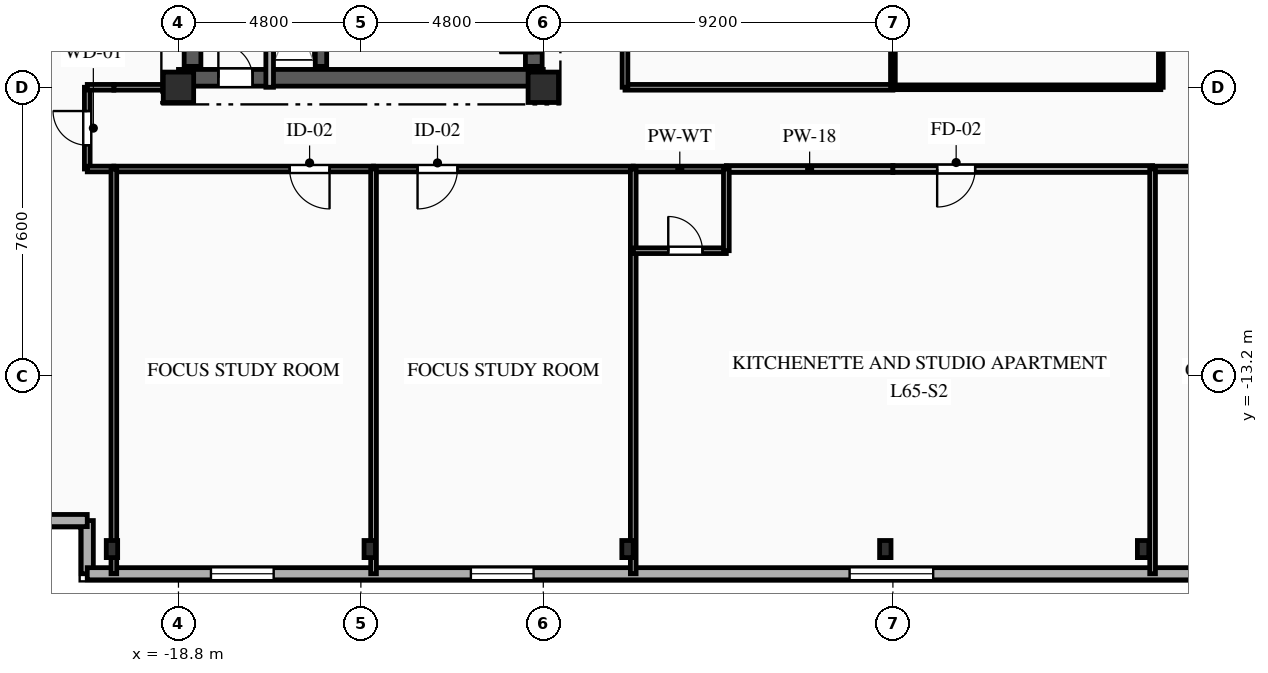
"""IFC4 building model, lengths in metres.
Left out: names, types, materials, properties, quantities, classifications, styles, units other than length and angle.
Written with IfcOpenShell. Run it as: python <this file> out.ifc"""

import sys

from ifc_helpers import new_model, si_unit, direction, frame, frame_2d, origin, origin_2d, place, context, subcontext, project, spatial, rectangle, i_section, extrude, element, fill, save


model = new_model("IFC4")
c1 = context("Model", 3, precision=1e-05, world=origin(), true_north=direction((0.0, 1.0)))
c2 = subcontext(c1, "Body", "Model", "MODEL_VIEW")
j1 = project(units=[si_unit("LENGTHUNIT", "METRE"), si_unit("PLANEANGLEUNIT", "RADIAN")], contexts=[c1])
p1 = place(None, origin())
s1 = spatial("IfcSite", under=j1, at=p1, CompositionType="ELEMENT")
p2 = place(p1, origin())
s2 = spatial("IfcBuilding", under=s1, at=p2, CompositionType="ELEMENT")
p3 = place(p2, frame((0.0, 0.0, 231.65)))
s3 = spatial("IfcBuildingStorey", under=s2, at=p3, CompositionType="ELEMENT", Elevation=231.65)
for number, where, z_axis, x_axis in (
    (1, (-18.8, -5.6, 0.0), (0.0, 0.0, 1.0), (1.0, 0.0, 0.0)),
    (2, (-9.2, -5.6, 0.0), (0.0, 0.0, 1.0), (1.0, 0.0, 0.0)),
):
    element("IfcColumn", number, at=place(p3, frame(where, z_axis=z_axis, x_axis=x_axis)), inside=s3, PredefinedType="COLUMN", context=c2, shape_type="SweptSolid", body=[
        extrude(rectangle(XDim=0.8, YDim=0.8, at=origin_2d()), origin(), (0.0, 0.0, 1.0), 3.35),
    ])
for number, where, z_axis, x_axis in (
    (3, (-20.55, -17.75, 0.0), (0.0, 0.0, 1.0), (1.0, 0.0, 0.0)),
    (4, (-13.767, -17.75, 0.0), (0.0, 0.0, 1.0), (1.0, 0.0, 0.0)),
    (5, (-6.983, -17.75, 0.0), (0.0, 0.0, 1.0), (1.0, 0.0, 0.0)),
    (6, (-0.2, -17.75, 0.0), (0.0, 0.0, 1.0), (1.0, 0.0, 0.0)),
    (7, (6.583, -17.75, 0.0), (0.0, 0.0, 1.0), (1.0, 0.0, 0.0)),
):
    element("IfcColumn", number, at=place(p3, frame(where, z_axis=z_axis, x_axis=x_axis)), inside=s3, PredefinedType="COLUMN", context=c2, shape_type="SweptSolid", body=[
        extrude(i_section(OverallWidth=0.3, OverallDepth=0.45, WebThickness=0.014, FlangeThickness=0.026, FilletRadius=0.027, at=origin_2d()), origin(), (0.0, 0.0, 1.0), 3.35),
    ])
p4 = place(p3, frame((-21.2, -18.4, 0.0), z_axis=(0.0, 0.0, 1.0), x_axis=(0.0, 1.0, 0.0)))
e8 = element("IfcWall", 8, at=p4, inside=s3, PredefinedType="SOLIDWALL", context=c2, shape_type="SweptSolid", body=[
    extrude(rectangle(XDim=1.4, YDim=0.32, at=frame_2d((0.7, 0.0))), origin(), (0.0, 0.0, 1.0), 3.04),
])
p5 = place(p3, frame((-21.2, -17.0, 0.0), z_axis=(0.0, 0.0, 1.0), x_axis=(-1.0, 0.0, 0.0)))
e9 = element("IfcWall", 9, at=p5, inside=s3, PredefinedType="SOLIDWALL", context=c2, shape_type="SweptSolid", body=[
    extrude(rectangle(XDim=1.4, YDim=0.32, at=frame_2d((0.7, 0.0))), origin(), (0.0, 0.0, 1.0), 3.04),
])
p6 = place(p3, frame((20.8, -18.4, 0.0), z_axis=(0.0, 0.0, 1.0), x_axis=(-1.0, 0.0, 0.0)))
e10 = element("IfcWall", 10, at=p6, inside=s3, PredefinedType="SOLIDWALL", context=c2, shape_type="SweptSolid", body=[
    extrude(rectangle(XDim=42.0, YDim=0.32, at=frame_2d((21.0, 0.0))), origin(), (0.0, 0.0, 1.0), 3.04),
])
p7 = place(p6, frame((3.015, 0.0, 0.85)))
e11 = element("IfcOpeningElement", 11, at=p7, cuts=e10, PredefinedType="OPENING", context=c2, shape_type="SweptSolid", body=[
    extrude(rectangle(XDim=1.65, YDim=1.85, at=frame_2d((0.825, 0.925))), frame((0.0, 0.17, 0.0), z_axis=(0.0, -1.0, 0.0), x_axis=(1.0, 0.0, 0.0)), (0.0, 0.0, 1.0), 0.34),
])
p8 = place(p6, frame((9.775, 0.0, 0.85)))
e12 = element("IfcOpeningElement", 12, at=p8, cuts=e10, PredefinedType="OPENING", context=c2, shape_type="SweptSolid", body=[
    extrude(rectangle(XDim=1.65, YDim=1.85, at=frame_2d((0.825, 0.925))), frame((0.0, 0.17, 0.0), z_axis=(0.0, -1.0, 0.0), x_axis=(1.0, 0.0, 0.0)), (0.0, 0.0, 1.0), 0.34),
])
p9 = place(p6, frame((19.74, 0.0, 0.85)))
e13 = element("IfcOpeningElement", 13, at=p9, cuts=e10, PredefinedType="OPENING", context=c2, shape_type="SweptSolid", body=[
    extrude(rectangle(XDim=2.2, YDim=1.85, at=frame_2d((1.1, 0.925))), frame((0.0, 0.17, 0.0), z_axis=(0.0, -1.0, 0.0), x_axis=(1.0, 0.0, 0.0)), (0.0, 0.0, 1.0), 0.34),
])
p10 = place(p6, frame((30.255, 0.0, 0.85)))
e14 = element("IfcOpeningElement", 14, at=p10, cuts=e10, PredefinedType="OPENING", context=c2, shape_type="SweptSolid", body=[
    extrude(rectangle(XDim=1.65, YDim=1.85, at=frame_2d((0.825, 0.925))), frame((0.0, 0.17, 0.0), z_axis=(0.0, -1.0, 0.0), x_axis=(1.0, 0.0, 0.0)), (0.0, 0.0, 1.0), 0.34),
])
p11 = place(p6, frame((37.095, 0.0, 0.85)))
e15 = element("IfcOpeningElement", 15, at=p11, cuts=e10, PredefinedType="OPENING", context=c2, shape_type="SweptSolid", body=[
    extrude(rectangle(XDim=1.65, YDim=1.85, at=frame_2d((0.825, 0.925))), frame((0.0, 0.17, 0.0), z_axis=(0.0, -1.0, 0.0), x_axis=(1.0, 0.0, 0.0)), (0.0, 0.0, 1.0), 0.34),
])
p12 = place(p3, frame((-18.8, -5.35, 0.0), z_axis=(0.0, 0.0, 1.0), x_axis=(1.0, 0.0, 0.0)))
e16 = element("IfcWall", 16, at=p12, inside=s3, PredefinedType="SHEAR", context=c2, shape_type="SweptSolid", body=[
    extrude(rectangle(XDim=9.6, YDim=0.44, at=frame_2d((4.8, 0.0))), origin(), (0.0, 0.0, 1.0), 3.04),
])
p13 = place(p12, frame((1.05, 0.0, 0.0)))
e17 = element("IfcOpeningElement", 17, at=p13, cuts=e16, PredefinedType="OPENING", context=c2, shape_type="SweptSolid", body=[
    extrude(rectangle(XDim=0.9, YDim=2.1, at=frame_2d((0.45, 1.05))), frame((0.0, 0.23, 0.0), z_axis=(0.0, -1.0, 0.0), x_axis=(1.0, 0.0, 0.0)), (0.0, 0.0, 1.0), 0.46),
])
p14 = place(p3, frame((-18.43, -5.05, 0.0), z_axis=(0.0, 0.0, 1.0), x_axis=(0.0, 1.0, 0.0)))
e18 = element("IfcWall", 18, at=p14, inside=s3, PredefinedType="SHEAR", context=c2, shape_type="SweptSolid", body=[
    extrude(rectangle(XDim=10.1, YDim=0.44, at=frame_2d((5.05, 0.0))), origin(), (0.0, 0.0, 1.0), 3.04),
])
p15 = place(p3, frame((-9.45, -5.05, 0.0), z_axis=(0.0, 0.0, 1.0), x_axis=(0.0, 1.0, 0.0)))
e19 = element("IfcWall", 19, at=p15, inside=s3, PredefinedType="SHEAR", context=c2, shape_type="SweptSolid", body=[
    extrude(rectangle(XDim=10.1, YDim=0.44, at=frame_2d((5.05, 0.0))), origin(), (0.0, 0.0, 1.0), 3.04),
])
p16 = place(p15, frame((7.175, 0.0, 0.0)))
e20 = element("IfcOpeningElement", 20, at=p16, cuts=e19, PredefinedType="OPENING", context=c2, shape_type="SweptSolid", body=[
    extrude(rectangle(XDim=0.9, YDim=2.1, at=frame_2d((0.45, 1.05))), frame((0.0, 0.23, 0.0), z_axis=(0.0, -1.0, 0.0), x_axis=(1.0, 0.0, 0.0)), (0.0, 0.0, 1.0), 0.46),
])
p17 = place(p15, frame((2.4, 0.0, 0.0)))
e21 = element("IfcOpeningElement", 21, at=p17, cuts=e19, PredefinedType="OPENING", context=c2, shape_type="SweptSolid", body=[
    extrude(rectangle(XDim=1.2, YDim=2.15, at=frame_2d((0.6, 1.075))), frame((0.0, 0.23, 0.0), z_axis=(0.0, -1.0, 0.0), x_axis=(1.0, 0.0, 0.0)), (0.0, 0.0, 1.0), 0.46),
])
p18 = place(p15, frame((0.35, 0.0, 0.0)))
e22 = element("IfcOpeningElement", 22, at=p18, cuts=e19, PredefinedType="OPENING", context=c2, shape_type="SweptSolid", body=[
    extrude(rectangle(XDim=0.9, YDim=2.1, at=frame_2d((0.45, 1.05))), frame((0.0, 0.23, 0.0), z_axis=(0.0, -1.0, 0.0), x_axis=(1.0, 0.0, 0.0)), (0.0, 0.0, 1.0), 0.46),
])
p19 = place(p15, frame((5.0, 0.0, 0.0)))
e23 = element("IfcOpeningElement", 23, at=p19, cuts=e19, PredefinedType="OPENING", context=c2, shape_type="SweptSolid", body=[
    extrude(rectangle(XDim=0.9, YDim=2.1, at=frame_2d((0.45, 1.05))), frame((0.0, 0.23, 0.0), z_axis=(0.0, -1.0, 0.0), x_axis=(1.0, 0.0, 0.0)), (0.0, 0.0, 1.0), 0.46),
])
p20 = place(p3, frame((-15.05, -5.05, 0.0), z_axis=(0.0, 0.0, 1.0), x_axis=(0.0, 1.0, 0.0)))
e24 = element("IfcWall", 24, at=p20, inside=s3, PredefinedType="SHEAR", context=c2, shape_type="SweptSolid", body=[
    extrude(rectangle(XDim=10.1, YDim=0.3, at=frame_2d((5.05, 0.0))), origin(), (0.0, 0.0, 1.0), 3.04),
])
p21 = place(p3, frame((-16.4, -5.6, 0.0), z_axis=(0.0, 0.0, 1.0), x_axis=(0.0, 1.0, 0.0)))
e25 = element("IfcWall", 25, at=p21, inside=s3, PredefinedType="PARTITIONING", context=c2, shape_type="SweptSolid", body=[
    extrude(rectangle(XDim=3.49, YDim=0.2, at=frame_2d((1.745, 0.0))), origin(), (0.0, 0.0, 1.0), 3.04),
])
p22 = place(p3, frame((-21.2, -7.75, 0.0), z_axis=(0.0, 0.0, 1.0), x_axis=(0.0, 1.0, 0.0)))
e26 = element("IfcWall", 26, at=p22, inside=s3, PredefinedType="PARTITIONING", context=c2, shape_type="SweptSolid", body=[
    extrude(rectangle(XDim=2.15, YDim=0.15, at=frame_2d((1.075, 0.0))), origin(), (0.0, 0.0, 1.0), 2.695),
])
p23 = place(p22, frame((0.625, 0.0, 0.0)))
e27 = element("IfcOpeningElement", 27, at=p23, cuts=e26, PredefinedType="OPENING", context=c2, shape_type="SweptSolid", body=[
    extrude(rectangle(XDim=0.9, YDim=2.1, at=frame_2d((0.45, 1.05))), frame((0.0, 0.085, 0.0), z_axis=(0.0, -1.0, 0.0), x_axis=(1.0, 0.0, 0.0)), (0.0, 0.0, 1.0), 0.17),
])
p24 = place(p3, frame((-20.5, -5.6, 0.0), z_axis=(0.0, 0.0, 1.0), x_axis=(1.0, 0.0, 0.0)))
e28 = element("IfcWall", 28, at=p24, inside=s3, PredefinedType="PARTITIONING", context=c2, shape_type="SweptSolid", body=[
    extrude(rectangle(XDim=1.7, YDim=0.15, at=frame_2d((0.85, 0.0))), origin(), (0.0, 0.0, 1.0), 3.04),
])
for number, where, z_axis, x_axis in (
    (29, (-20.5, -7.75, 0.0), (0.0, 0.0, 1.0), (-1.0, 0.0, 0.0)),
    (30, (-21.2, -5.6, 0.0), (0.0, 0.0, 1.0), (1.0, 0.0, 0.0)),
):
    element("IfcWall", number, at=place(p3, frame(where, z_axis=z_axis, x_axis=x_axis)), inside=s3, PredefinedType="PARTITIONING", context=c2, shape_type="SweptSolid", body=[
        extrude(rectangle(XDim=0.7, YDim=0.15, at=frame_2d((0.35, 0.0))), origin(), (0.0, 0.0, 1.0), 3.04),
    ])
p25 = place(p3, frame((-13.667, -7.75, 0.0), z_axis=(0.0, 0.0, 1.0), x_axis=(-1.0, 0.0, 0.0)))
e31 = element("IfcWall", 31, at=p25, inside=s3, PredefinedType="PARTITIONING", context=c2, shape_type="SweptSolid", body=[
    extrude(rectangle(XDim=6.833, YDim=0.15, at=frame_2d((3.417, 0.0))), origin(), (0.0, 0.0, 1.0), 3.04),
])
p26 = place(p25, frame((1.158, 0.0, 0.0)))
e32 = element("IfcOpeningElement", 32, at=p26, cuts=e31, PredefinedType="OPENING", context=c2, shape_type="SweptSolid", body=[
    extrude(rectangle(XDim=1.05, YDim=2.15, at=frame_2d((0.525, 1.075))), frame((0.0, 0.085, 0.0), z_axis=(0.0, -1.0, 0.0), x_axis=(1.0, 0.0, 0.0)), (0.0, 0.0, 1.0), 0.17),
])
p27 = place(p3, frame((-6.833, -7.75, 0.0), z_axis=(0.0, 0.0, 1.0), x_axis=(-1.0, 0.0, 0.0)))
e33 = element("IfcWall", 33, at=p27, inside=s3, PredefinedType="PARTITIONING", context=c2, shape_type="SweptSolid", body=[
    extrude(rectangle(XDim=6.833, YDim=0.15, at=frame_2d((3.417, 0.0))), origin(), (0.0, 0.0, 1.0), 3.04),
])
p28 = place(p27, frame((4.625, 0.0, 0.0)))
e34 = element("IfcOpeningElement", 34, at=p28, cuts=e33, PredefinedType="OPENING", context=c2, shape_type="SweptSolid", body=[
    extrude(rectangle(XDim=1.05, YDim=2.15, at=frame_2d((0.525, 1.075))), frame((0.0, 0.085, 0.0), z_axis=(0.0, -1.0, 0.0), x_axis=(1.0, 0.0, 0.0)), (0.0, 0.0, 1.0), 0.17),
])
p29 = place(p3, frame((0.0, -7.75, 0.0), z_axis=(0.0, 0.0, 1.0), x_axis=(-1.0, 0.0, 0.0)))
e35 = element("IfcWall", 35, at=p29, inside=s3, PredefinedType="PARTITIONING", context=c2, shape_type="SweptSolid", body=[
    extrude(rectangle(XDim=4.383, YDim=0.18, at=frame_2d((2.191, 0.0))), origin(), (0.0, 0.0, 1.0), 3.04),
])
p30 = place(p3, frame((-4.383, -7.75, 0.0), z_axis=(0.0, 0.0, 1.0), x_axis=(-1.0, 0.0, 0.0)))
e36 = element("IfcWall", 36, at=p30, inside=s3, PredefinedType="PLUMBINGWALL", context=c2, shape_type="SweptSolid", body=[
    extrude(rectangle(XDim=2.45, YDim=0.15, at=frame_2d((1.225, 0.0))), origin(), (0.0, 0.0, 1.0), 3.04),
])
p31 = place(p3, frame((-7.05, -5.6, 0.0), z_axis=(0.0, 0.0, 1.0), x_axis=(1.0, 0.0, 0.0)))
e37 = element("IfcWall", 37, at=p31, inside=s3, PredefinedType="PARTITIONING", context=c2, shape_type="SweptSolid", body=[
    extrude(rectangle(XDim=7.05, YDim=0.15, at=frame_2d((3.525, 0.0))), origin(), (0.0, 0.0, 1.0), 2.525),
])
p32 = place(p3, frame((6.833, -7.75, 0.0), z_axis=(0.0, 0.0, 1.0), x_axis=(-1.0, 0.0, 0.0)))
e38 = element("IfcWall", 38, at=p32, inside=s3, PredefinedType="PARTITIONING", context=c2, shape_type="SweptSolid", body=[
    extrude(rectangle(XDim=6.833, YDim=0.18, at=frame_2d((3.417, 0.0))), origin(), (0.0, 0.0, 1.0), 3.04),
])
p33 = place(p32, frame((4.669, 0.0, 0.0)))
e39 = element("IfcOpeningElement", 39, at=p33, cuts=e38, PredefinedType="OPENING", context=c2, shape_type="SweptSolid", body=[
    extrude(rectangle(XDim=1.0, YDim=2.15, at=frame_2d((0.5, 1.075))), frame((0.0, 0.1, 0.0), z_axis=(0.0, -1.0, 0.0), x_axis=(1.0, 0.0, 0.0)), (0.0, 0.0, 1.0), 0.2),
])
p34 = place(p3, frame((13.667, -7.75, 0.0), z_axis=(0.0, 0.0, 1.0), x_axis=(-1.0, 0.0, 0.0)))
e40 = element("IfcWall", 40, at=p34, inside=s3, PredefinedType="PARTITIONING", context=c2, shape_type="SweptSolid", body=[
    extrude(rectangle(XDim=6.833, YDim=0.15, at=frame_2d((3.417, 0.0))), origin(), (0.0, 0.0, 1.0), 3.04),
])
p35 = place(p34, frame((1.158, 0.0, 0.0)))
e41 = element("IfcOpeningElement", 41, at=p35, cuts=e40, PredefinedType="OPENING", context=c2, shape_type="SweptSolid", body=[
    extrude(rectangle(XDim=1.05, YDim=2.15, at=frame_2d((0.525, 1.075))), frame((0.0, 0.085, 0.0), z_axis=(0.0, -1.0, 0.0), x_axis=(1.0, 0.0, 0.0)), (0.0, 0.0, 1.0), 0.17),
])
p36 = place(p3, frame((0.0, -5.6, 0.0), z_axis=(0.0, 0.0, 1.0), x_axis=(1.0, 0.0, 0.0)))
e42 = element("IfcWall", 42, at=p36, inside=s3, PredefinedType="PARTITIONING", context=c2, shape_type="SweptSolid", body=[
    extrude(rectangle(XDim=7.05, YDim=0.125, at=frame_2d((3.525, 0.0))), origin(), (0.0, 0.0, 1.0), 2.525),
])
p37 = place(p3, frame((-7.05, 8.5, 0.0), z_axis=(0.0, 0.0, 1.0), x_axis=(0.0, -1.0, 0.0)))
e43 = element("IfcWall", 43, at=p37, inside=s3, PredefinedType="PARTITIONING", context=c2, shape_type="SweptSolid", body=[
    extrude(rectangle(XDim=14.1, YDim=0.15, at=frame_2d((7.05, 0.0))), origin(), (0.0, 0.0, 1.0), 3.04),
])
p38 = place(p37, frame((8.074, 0.0, 0.0)))
e44 = element("IfcOpeningElement", 44, at=p38, cuts=e43, PredefinedType="OPENING", context=c2, shape_type="SweptSolid", body=[
    extrude(rectangle(XDim=0.95, YDim=2.1, at=frame_2d((0.475, 1.05))), frame((0.0, 0.085, 0.0), z_axis=(0.0, -1.0, 0.0), x_axis=(1.0, 0.0, 0.0)), (0.0, 0.0, 1.0), 0.17),
])
p39 = place(p3, frame((7.05, -5.6, 0.0), z_axis=(0.0, 0.0, 1.0), x_axis=(0.0, 1.0, 0.0)))
e45 = element("IfcWall", 45, at=p39, inside=s3, PredefinedType="PARTITIONING", context=c2, shape_type="SweptSolid", body=[
    extrude(rectangle(XDim=14.1, YDim=0.125, at=frame_2d((7.05, 0.0))), origin(), (0.0, 0.0, 1.0), 3.04),
])
p40 = place(p39, frame((5.076, 0.0, 0.0)))
e46 = element("IfcOpeningElement", 46, at=p40, cuts=e45, PredefinedType="OPENING", context=c2, shape_type="SweptSolid", body=[
    extrude(rectangle(XDim=0.95, YDim=2.1, at=frame_2d((0.475, 1.05))), frame((0.0, 0.073, 0.0), z_axis=(0.0, -1.0, 0.0), x_axis=(1.0, 0.0, 0.0)), (0.0, 0.0, 1.0), 0.145),
])
p41 = place(p3, frame((-20.5, -7.75, 0.0), z_axis=(0.0, 0.0, 1.0), x_axis=(0.0, -1.0, 0.0)))
e47 = element("IfcWall", 47, at=p41, inside=s3, PredefinedType="PARTITIONING", context=c2, shape_type="SweptSolid", body=[
    extrude(rectangle(XDim=10.65, YDim=0.15, at=frame_2d((5.325, 0.0))), origin(), (0.0, 0.0, 1.0), 2.665),
])
p42 = place(p3, frame((-13.667, -7.75, 0.0), z_axis=(0.0, 0.0, 1.0), x_axis=(0.0, -1.0, 0.0)))
e48 = element("IfcWall", 48, at=p42, inside=s3, PredefinedType="PARTITIONING", context=c2, shape_type="SweptSolid", body=[
    extrude(rectangle(XDim=10.65, YDim=0.15, at=frame_2d((5.325, 0.0))), origin(), (0.0, 0.0, 1.0), 3.04),
])
p43 = place(p3, frame((-6.833, -9.9, 0.0), z_axis=(0.0, 0.0, 1.0), x_axis=(0.0, -1.0, 0.0)))
e49 = element("IfcWall", 49, at=p43, inside=s3, PredefinedType="PARTITIONING", context=c2, shape_type="SweptSolid", body=[
    extrude(rectangle(XDim=8.5, YDim=0.15, at=frame_2d((4.25, 0.0))), origin(), (0.0, 0.0, 1.0), 2.665),
])
p44 = place(p3, frame((-6.833, -7.75, 0.0), z_axis=(0.0, 0.0, 1.0), x_axis=(0.0, -1.0, 0.0)))
e50 = element("IfcWall", 50, at=p44, inside=s3, PredefinedType="PLUMBINGWALL", context=c2, shape_type="SweptSolid", body=[
    extrude(rectangle(XDim=2.15, YDim=0.15, at=frame_2d((1.075, 0.0))), origin(), (0.0, 0.0, 1.0), 3.04),
])
p45 = place(p3, frame((-6.833, -9.9, 0.0), z_axis=(0.0, 0.0, 1.0), x_axis=(1.0, 0.0, 0.0)))
e51 = element("IfcWall", 51, at=p45, inside=s3, PredefinedType="PLUMBINGWALL", context=c2, shape_type="SweptSolid", body=[
    extrude(rectangle(XDim=2.45, YDim=0.15, at=frame_2d((1.225, 0.0))), origin(), (0.0, 0.0, 1.0), 3.04),
])
p46 = place(p45, frame((0.921, 0.0, 0.0)))
e52 = element("IfcOpeningElement", 52, at=p46, cuts=e51, PredefinedType="OPENING", context=c2, shape_type="SweptSolid", body=[
    extrude(rectangle(XDim=0.9, YDim=2.1, at=frame_2d((0.45, 1.05))), frame((0.0, 0.085, 0.0), z_axis=(0.0, -1.0, 0.0), x_axis=(1.0, 0.0, 0.0)), (0.0, 0.0, 1.0), 0.17),
])
p47 = place(p3, frame((-4.383, -9.9, 0.0), z_axis=(0.0, 0.0, 1.0), x_axis=(0.0, 1.0, 0.0)))
e53 = element("IfcWall", 53, at=p47, inside=s3, PredefinedType="PLUMBINGWALL", context=c2, shape_type="SweptSolid", body=[
    extrude(rectangle(XDim=2.15, YDim=0.15, at=frame_2d((1.075, 0.0))), origin(), (0.0, 0.0, 1.0), 3.04),
])
p48 = place(p3, frame((6.833, -7.75, 0.0), z_axis=(0.0, 0.0, 1.0), x_axis=(0.0, -1.0, 0.0)))
e54 = element("IfcWall", 54, at=p48, inside=s3, PredefinedType="PARTITIONING", context=c2, shape_type="SweptSolid", body=[
    extrude(rectangle(XDim=10.65, YDim=0.15, at=frame_2d((5.325, 0.0))), origin(), (0.0, 0.0, 1.0), 2.665),
])
p49 = place(p3, frame((0.0, 8.5, 0.0), z_axis=(0.0, 0.0, 1.0), x_axis=(0.0, -1.0, 0.0)))
e55 = element("IfcWall", 55, at=p49, inside=s3, PredefinedType="PARTITIONING", context=c2, shape_type="SweptSolid", body=[
    extrude(rectangle(XDim=14.1, YDim=0.125, at=frame_2d((7.05, 0.0))), origin(), (0.0, 0.0, 1.0), 3.04),
])
p50 = place(p9, origin())
e56 = element("IfcWindow", 56, at=p50, inside=s3, PartitioningType="SINGLE_PANEL", PredefinedType="WINDOW", context=c2, shape_type="SweptSolid", body=[
    extrude(rectangle(XDim=2.2, YDim=1.85, at=frame_2d((1.1, 0.925))), frame((0.0, 0.03, 0.0), z_axis=(0.0, -1.0, 0.0), x_axis=(1.0, 0.0, 0.0)), (0.0, 0.0, 1.0), 0.06),
])
fill(e13, e56)
p51 = place(p10, origin())
e57 = element("IfcWindow", 57, at=p51, inside=s3, PartitioningType="SINGLE_PANEL", PredefinedType="WINDOW", context=c2, shape_type="SweptSolid", body=[
    extrude(rectangle(XDim=1.65, YDim=1.85, at=frame_2d((0.825, 0.925))), frame((0.0, 0.03, 0.0), z_axis=(0.0, -1.0, 0.0), x_axis=(1.0, 0.0, 0.0)), (0.0, 0.0, 1.0), 0.06),
])
fill(e14, e57)
p52 = place(p11, origin())
e58 = element("IfcWindow", 58, at=p52, inside=s3, PartitioningType="SINGLE_PANEL", PredefinedType="WINDOW", context=c2, shape_type="SweptSolid", body=[
    extrude(rectangle(XDim=1.65, YDim=1.85, at=frame_2d((0.825, 0.925))), frame((0.0, 0.03, 0.0), z_axis=(0.0, -1.0, 0.0), x_axis=(1.0, 0.0, 0.0)), (0.0, 0.0, 1.0), 0.06),
])
fill(e15, e58)
p53 = place(p13, origin())
e59 = element("IfcDoor", 59, at=p53, inside=s3, OperationType="SINGLE_SWING_LEFT", PredefinedType="DOOR", context=c2, shape_type="SweptSolid", body=[
    extrude(rectangle(XDim=0.9, YDim=2.1, at=frame_2d((0.45, 1.05))), frame((0.0, 0.025, 0.0), z_axis=(0.0, -1.0, 0.0), x_axis=(1.0, 0.0, 0.0)), (0.0, 0.0, 1.0), 0.05),
])
fill(e17, e59)
p54 = place(p18, origin())
e60 = element("IfcDoor", 60, at=p54, inside=s3, OperationType="SINGLE_SWING_LEFT", PredefinedType="DOOR", context=c2, shape_type="SweptSolid", body=[
    extrude(rectangle(XDim=0.9, YDim=2.1, at=frame_2d((0.45, 1.05))), frame((0.0, 0.025, 0.0), z_axis=(0.0, -1.0, 0.0), x_axis=(1.0, 0.0, 0.0)), (0.0, 0.0, 1.0), 0.05),
])
fill(e22, e60)
p55 = place(p23, origin())
e61 = element("IfcDoor", 61, at=p55, inside=s3, OperationType="SINGLE_SWING_RIGHT", PredefinedType="DOOR", context=c2, shape_type="SweptSolid", body=[
    extrude(rectangle(XDim=0.9, YDim=2.1, at=frame_2d((0.45, 1.05))), frame((0.0, 0.025, 0.0), z_axis=(0.0, -1.0, 0.0), x_axis=(1.0, 0.0, 0.0)), (0.0, 0.0, 1.0), 0.05),
])
fill(e27, e61)
p56 = place(p26, origin())
e62 = element("IfcDoor", 62, at=p56, inside=s3, OperationType="SINGLE_SWING_LEFT", PredefinedType="DOOR", context=c2, shape_type="SweptSolid", body=[
    extrude(rectangle(XDim=1.05, YDim=2.15, at=frame_2d((0.525, 1.075))), frame((0.0, 0.025, 0.0), z_axis=(0.0, -1.0, 0.0), x_axis=(1.0, 0.0, 0.0)), (0.0, 0.0, 1.0), 0.05),
])
fill(e32, e62)
p57 = place(p28, origin())
e63 = element("IfcDoor", 63, at=p57, inside=s3, OperationType="SINGLE_SWING_RIGHT", PredefinedType="DOOR", context=c2, shape_type="SweptSolid", body=[
    extrude(rectangle(XDim=1.05, YDim=2.15, at=frame_2d((0.525, 1.075))), frame((0.0, 0.025, 0.0), z_axis=(0.0, -1.0, 0.0), x_axis=(1.0, 0.0, 0.0)), (0.0, 0.0, 1.0), 0.05),
])
fill(e34, e63)
p58 = place(p33, origin())
e64 = element("IfcDoor", 64, at=p58, inside=s3, OperationType="SINGLE_SWING_RIGHT", PredefinedType="DOOR", context=c2, shape_type="SweptSolid", body=[
    extrude(rectangle(XDim=1.0, YDim=2.15, at=frame_2d((0.5, 1.075))), frame((0.0, 0.025, 0.0), z_axis=(0.0, -1.0, 0.0), x_axis=(1.0, 0.0, 0.0)), (0.0, 0.0, 1.0), 0.05),
])
fill(e39, e64)
p59 = place(p46, origin())
e65 = element("IfcDoor", 65, at=p59, inside=s3, OperationType="SINGLE_SWING_LEFT", PredefinedType="DOOR", context=c2, shape_type="SweptSolid", body=[
    extrude(rectangle(XDim=0.9, YDim=2.1, at=frame_2d((0.45, 1.05))), frame((0.0, 0.025, 0.0), z_axis=(0.0, -1.0, 0.0), x_axis=(1.0, 0.0, 0.0)), (0.0, 0.0, 1.0), 0.05),
])
fill(e52, e65)
save(model, sys.argv[1])
